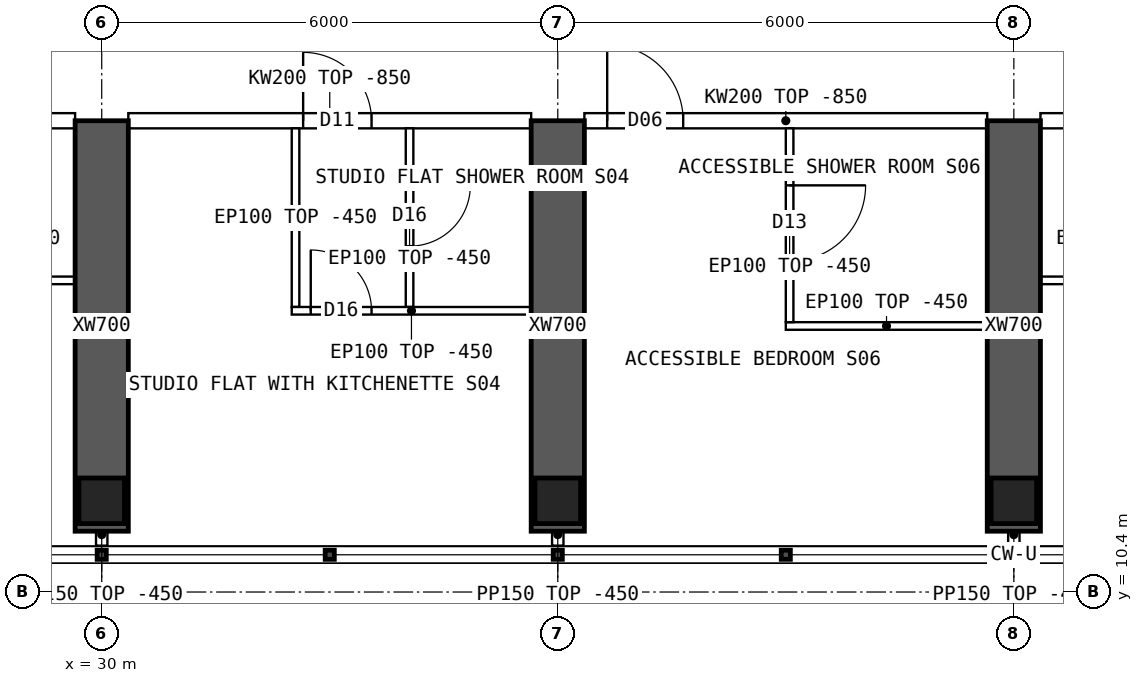
"""IFC4 building model, lengths in metres.
Left out: names, types, materials, properties, quantities, classifications, styles, units other than length and angle.
Written with IfcOpenShell. Run it as: python <this file> out.ifc"""

import sys

from ifc_helpers import new_model, si_unit, direction, frame, frame_2d, origin, origin_2d, place, context, subcontext, project, spatial, polyline, rectangle, hollow_rectangle, outline, extrude, element, fill, save


model = new_model("IFC4")
c1 = context("Model", 3, precision=1e-05, world=origin(), true_north=direction((0.0, 1.0)))
c2 = subcontext(c1, "Body", "Model", "MODEL_VIEW")
j1 = project(units=[si_unit("LENGTHUNIT", "METRE"), si_unit("PLANEANGLEUNIT", "RADIAN")], contexts=[c1])
p1 = place(None, origin())
s1 = spatial("IfcSite", under=j1, at=p1, CompositionType="ELEMENT")
p2 = place(p1, origin())
s2 = spatial("IfcBuilding", under=s1, at=p2, CompositionType="ELEMENT")
p3 = place(p2, frame((0.0, 0.0, 227.8)))
s3 = spatial("IfcBuildingStorey", under=s2, at=p3, CompositionType="ELEMENT", Elevation=227.8)
for number, where, z_axis, x_axis in (
    (1, (30.0, 11.6, 0.0), (0.0, 0.0, 1.0), (1.0, 0.0, 0.0)),
    (2, (36.0, 11.6, 0.0), (0.0, 0.0, 1.0), (1.0, 0.0, 0.0)),
    (3, (42.0, 11.6, 0.0), (0.0, 0.0, 1.0), (1.0, 0.0, 0.0)),
):
    element("IfcColumn", number, at=place(p3, frame(where, z_axis=z_axis, x_axis=x_axis)), inside=s3, PredefinedType="COLUMN", context=c2, shape_type="SweptSolid", body=[
        extrude(hollow_rectangle(XDim=0.6, YDim=0.6, WallThickness=0.06, at=origin_2d()), origin(), (0.0, 0.0, 1.0), 3.75),
    ])
for number, where, z_axis, x_axis in (
    (4, (30.0, 11.2, 0.0), (0.0, 0.0, 1.0), (0.0, 1.0, 0.0)),
    (5, (36.0, 11.2, 0.0), (0.0, 0.0, 1.0), (0.0, 1.0, 0.0)),
    (6, (42.0, 11.2, 0.0), (0.0, 0.0, 1.0), (0.0, 1.0, 0.0)),
):
    element("IfcWall", number, at=place(p3, frame(where, z_axis=z_axis, x_axis=x_axis)), inside=s3, PredefinedType="SHEAR", context=c2, shape_type="SweptSolid", body=[
        extrude(rectangle(XDim=5.4, YDim=0.7, at=frame_2d((2.7, 0.0))), origin(), (0.0, 0.0, 1.0), 3.75),
    ])
p4 = place(p3, frame((24.35, 16.6, 0.0), z_axis=(0.0, 0.0, 1.0), x_axis=(1.0, 0.0, 0.0)))
e7 = element("IfcWall", 7, at=p4, inside=s3, PredefinedType="SOLIDWALL", context=c2, shape_type="SweptSolid", body=[
    extrude(outline(polyline([(0.0, 0.0), (5.3, 0.0), (5.3, 2.9), (0.0, 2.9), (0.0, 0.0)])), frame((0.0, 0.1, 0.0), z_axis=(0.0, -1.0, 0.0), x_axis=(1.0, 0.0, 0.0)), (0.0, 0.0, 1.0), 0.2),
])
p5 = place(p4, frame((0.1, 0.0, 0.0)))
e8 = element("IfcOpeningElement", 8, at=p5, cuts=e7, PredefinedType="OPENING", context=c2, shape_type="SweptSolid", body=[
    extrude(rectangle(XDim=0.9, YDim=2.1, at=frame_2d((0.45, 1.05))), frame((0.0, 0.11, 0.0), z_axis=(0.0, -1.0, 0.0), x_axis=(1.0, 0.0, 0.0)), (0.0, 0.0, 1.0), 0.22),
])
p6 = place(p3, frame((30.35, 16.6, 0.0), z_axis=(0.0, 0.0, 1.0), x_axis=(1.0, 0.0, 0.0)))
e9 = element("IfcWall", 9, at=p6, inside=s3, PredefinedType="SOLIDWALL", context=c2, shape_type="SweptSolid", body=[
    extrude(outline(polyline([(0.0, 0.0), (5.3, 0.0), (5.3, 2.9), (0.0, 2.9), (0.0, 0.0)])), frame((0.0, 0.1, 0.0), z_axis=(0.0, -1.0, 0.0), x_axis=(1.0, 0.0, 0.0)), (0.0, 0.0, 1.0), 0.2),
])
p7 = place(p6, frame((2.3, 0.0, 0.0)))
e10 = element("IfcOpeningElement", 10, at=p7, cuts=e9, PredefinedType="OPENING", context=c2, shape_type="SweptSolid", body=[
    extrude(rectangle(XDim=0.9, YDim=2.1, at=frame_2d((0.45, 1.05))), frame((0.0, 0.11, 0.0), z_axis=(0.0, -1.0, 0.0), x_axis=(1.0, 0.0, 0.0)), (0.0, 0.0, 1.0), 0.22),
])
p8 = place(p3, frame((36.35, 16.6, 0.0), z_axis=(0.0, 0.0, 1.0), x_axis=(1.0, 0.0, 0.0)))
e11 = element("IfcWall", 11, at=p8, inside=s3, PredefinedType="SOLIDWALL", context=c2, shape_type="SweptSolid", body=[
    extrude(outline(polyline([(0.0, 0.0), (5.3, 0.0), (5.3, 2.9), (0.0, 2.9), (0.0, 0.0)])), frame((0.0, 0.1, 0.0), z_axis=(0.0, -1.0, 0.0), x_axis=(1.0, 0.0, 0.0)), (0.0, 0.0, 1.0), 0.2),
])
p9 = place(p8, frame((0.3, 0.0, 0.0)))
e12 = element("IfcOpeningElement", 12, at=p9, cuts=e11, PredefinedType="OPENING", context=c2, shape_type="SweptSolid", body=[
    extrude(rectangle(XDim=1.0, YDim=2.1, at=frame_2d((0.5, 1.05))), frame((0.0, 0.11, 0.0), z_axis=(0.0, -1.0, 0.0), x_axis=(1.0, 0.0, 0.0)), (0.0, 0.0, 1.0), 0.22),
])
p10 = place(p3, frame((42.35, 16.6, 0.0), z_axis=(0.0, 0.0, 1.0), x_axis=(1.0, 0.0, 0.0)))
e13 = element("IfcWall", 13, at=p10, inside=s3, PredefinedType="SOLIDWALL", context=c2, shape_type="SweptSolid", body=[
    extrude(outline(polyline([(0.0, 0.0), (5.3, 0.0), (5.3, 2.9), (0.0, 2.9), (0.0, 0.0)])), frame((0.0, 0.1, 0.0), z_axis=(0.0, -1.0, 0.0), x_axis=(1.0, 0.0, 0.0)), (0.0, 0.0, 1.0), 0.2),
])
p11 = place(p10, frame((2.6, 0.0, 0.0)))
e14 = element("IfcOpeningElement", 14, at=p11, cuts=e13, PredefinedType="OPENING", context=c2, shape_type="SweptSolid", body=[
    extrude(rectangle(XDim=0.9, YDim=2.1, at=frame_2d((0.45, 1.05))), frame((0.0, 0.11, 0.0), z_axis=(0.0, -1.0, 0.0), x_axis=(1.0, 0.0, 0.0)), (0.0, 0.0, 1.0), 0.22),
])
p12 = place(p3, frame((29.65, 14.5, 0.0), z_axis=(0.0, 0.0, 1.0), x_axis=(-1.0, 0.0, 0.0)))
e15 = element("IfcWall", 15, at=p12, inside=s3, PredefinedType="PARTITIONING", context=c2, shape_type="SweptSolid", body=[
    extrude(rectangle(XDim=2.55, YDim=0.1, at=frame_2d((1.275, 0.0))), origin(), (0.0, 0.0, 1.0), 3.3),
])
p13 = place(p12, frame((0.825, 0.0, 0.0)))
e16 = element("IfcOpeningElement", 16, at=p13, cuts=e15, PredefinedType="OPENING", context=c2, shape_type="SweptSolid", body=[
    extrude(rectangle(XDim=0.9, YDim=2.1, at=frame_2d((0.45, 1.05))), frame((0.0, 0.06, 0.0), z_axis=(0.0, -1.0, 0.0), x_axis=(1.0, 0.0, 0.0)), (0.0, 0.0, 1.0), 0.12),
])
p14 = place(p3, frame((35.65, 14.1, 0.0), z_axis=(0.0, 0.0, 1.0), x_axis=(-1.0, 0.0, 0.0)))
e17 = element("IfcWall", 17, at=p14, inside=s3, PredefinedType="PARTITIONING", context=c2, shape_type="SweptSolid", body=[
    extrude(rectangle(XDim=3.15, YDim=0.1, at=frame_2d((1.575, 0.0))), origin(), (0.0, 0.0, 1.0), 3.3),
])
p15 = place(p14, frame((2.1, 0.0, 0.0)))
e18 = element("IfcOpeningElement", 18, at=p15, cuts=e17, PredefinedType="OPENING", context=c2, shape_type="SweptSolid", body=[
    extrude(rectangle(XDim=0.8, YDim=2.1, at=frame_2d((0.4, 1.05))), frame((0.0, 0.06, 0.0), z_axis=(0.0, -1.0, 0.0), x_axis=(1.0, 0.0, 0.0)), (0.0, 0.0, 1.0), 0.12),
])
p16 = place(p3, frame((32.55, 14.15, 0.0), z_axis=(0.0, 0.0, 1.0), x_axis=(0.0, 1.0, 0.0)))
e19 = element("IfcWall", 19, at=p16, inside=s3, PredefinedType="PARTITIONING", context=c2, shape_type="SweptSolid", body=[
    extrude(outline(polyline([(0.0, 0.0), (2.35, 0.0), (2.35, 2.9), (2.302, 2.9), (2.3, 3.3), (0.0, 3.3), (0.0, 0.0)])), frame((0.0, 0.05, 0.0), z_axis=(0.0, -1.0, 0.0), x_axis=(1.0, 0.0, 0.0)), (0.0, 0.0, 1.0), 0.1),
])
p17 = place(p3, frame((34.05, 14.15, 0.0), z_axis=(0.0, 0.0, 1.0), x_axis=(0.0, 1.0, 0.0)))
e20 = element("IfcWall", 20, at=p17, inside=s3, PredefinedType="PARTITIONING", context=c2, shape_type="SweptSolid", body=[
    extrude(outline(polyline([(0.0, 0.0), (2.35, 0.0), (2.35, 2.9), (2.302, 2.9), (2.3, 3.3), (0.0, 3.3), (0.0, 0.0)])), frame((0.0, 0.05, 0.0), z_axis=(0.0, -1.0, 0.0), x_axis=(1.0, 0.0, 0.0)), (0.0, 0.0, 1.0), 0.1),
])
p18 = place(p17, frame((0.8, 0.0, 0.0)))
e21 = element("IfcOpeningElement", 21, at=p18, cuts=e20, PredefinedType="OPENING", context=c2, shape_type="SweptSolid", body=[
    extrude(rectangle(XDim=0.8, YDim=2.1, at=frame_2d((0.4, 1.05))), frame((0.0, 0.06, 0.0), z_axis=(0.0, -1.0, 0.0), x_axis=(1.0, 0.0, 0.0)), (0.0, 0.0, 1.0), 0.12),
])
p19 = place(p3, frame((39.0, 13.9, 0.0), z_axis=(0.0, 0.0, 1.0), x_axis=(1.0, 0.0, 0.0)))
e22 = element("IfcWall", 22, at=p19, inside=s3, PredefinedType="PARTITIONING", context=c2, shape_type="SweptSolid", body=[
    extrude(rectangle(XDim=2.65, YDim=0.1, at=frame_2d((1.325, 0.0))), origin(), (0.0, 0.0, 1.0), 3.3),
])
p20 = place(p3, frame((39.05, 13.95, 0.0), z_axis=(0.0, 0.0, 1.0), x_axis=(0.0, 1.0, 0.0)))
e23 = element("IfcWall", 23, at=p20, inside=s3, PredefinedType="PARTITIONING", context=c2, shape_type="SweptSolid", body=[
    extrude(outline(polyline([(0.0, 0.0), (2.55, 0.0), (2.55, 2.9), (2.502, 2.9), (2.5, 3.3), (0.0, 3.3), (0.0, 0.0)])), frame((0.0, 0.05, 0.0), z_axis=(0.0, -1.0, 0.0), x_axis=(1.0, 0.0, 0.0)), (0.0, 0.0, 1.0), 0.1),
])
p21 = place(p20, frame((0.8, 0.0, 0.0)))
e24 = element("IfcOpeningElement", 24, at=p21, cuts=e23, PredefinedType="OPENING", context=c2, shape_type="SweptSolid", body=[
    extrude(rectangle(XDim=1.0, YDim=2.1, at=frame_2d((0.5, 1.05))), frame((0.0, 0.06, 0.0), z_axis=(0.0, -1.0, 0.0), x_axis=(1.0, 0.0, 0.0)), (0.0, 0.0, 1.0), 0.12),
])
p22 = place(p3, frame((44.9, 14.5, 0.0), z_axis=(0.0, 0.0, 1.0), x_axis=(-1.0, 0.0, 0.0)))
e25 = element("IfcWall", 25, at=p22, inside=s3, PredefinedType="PARTITIONING", context=c2, shape_type="SweptSolid", body=[
    extrude(rectangle(XDim=2.55, YDim=0.1, at=frame_2d((1.275, 0.0))), origin(), (0.0, 0.0, 1.0), 3.3),
])
p23 = place(p22, frame((0.825, 0.0, 0.0)))
e26 = element("IfcOpeningElement", 26, at=p23, cuts=e25, PredefinedType="OPENING", context=c2, shape_type="SweptSolid", body=[
    extrude(rectangle(XDim=0.9, YDim=2.1, at=frame_2d((0.45, 1.05))), frame((0.0, 0.06, 0.0), z_axis=(0.0, -1.0, 0.0), x_axis=(1.0, 0.0, 0.0)), (0.0, 0.0, 1.0), 0.12),
])
for number, where, z_axis, x_axis in (
    (27, (30.0, 11.3, 0.0), (0.0, 0.0, 1.0), (0.0, -1.0, 0.0)),
    (28, (36.0, 11.3, 0.0), (0.0, 0.0, 1.0), (0.0, -1.0, 0.0)),
    (29, (42.0, 11.3, 0.0), (0.0, 0.0, 1.0), (0.0, -1.0, 0.0)),
):
    element("IfcWall", number, at=place(p3, frame(where, z_axis=z_axis, x_axis=x_axis)), inside=s3, PredefinedType="PARTITIONING", context=c2, shape_type="SweptSolid", body=[
        extrude(rectangle(XDim=0.29, YDim=0.15, at=frame_2d((0.145, 0.0))), origin(), (0.0, 0.0, 1.0), 3.3),
    ])
p24 = place(p15, origin())
e30 = element("IfcDoor", 30, at=p24, inside=s3, OperationType="SINGLE_SWING_RIGHT", PredefinedType="DOOR", context=c2, shape_type="SweptSolid", body=[
    extrude(rectangle(XDim=0.8, YDim=2.1, at=frame_2d((0.4, 1.05))), frame((0.0, 0.025, 0.0), z_axis=(0.0, -1.0, 0.0), x_axis=(1.0, 0.0, 0.0)), (0.0, 0.0, 1.0), 0.05),
])
fill(e18, e30)
p25 = place(p18, origin())
e31 = element("IfcDoor", 31, at=p25, inside=s3, OperationType="SINGLE_SWING_RIGHT", PredefinedType="DOOR", context=c2, shape_type="SweptSolid", body=[
    extrude(rectangle(XDim=0.8, YDim=2.1, at=frame_2d((0.4, 1.05))), frame((0.0, 0.025, 0.0), z_axis=(0.0, -1.0, 0.0), x_axis=(1.0, 0.0, 0.0)), (0.0, 0.0, 1.0), 0.05),
])
fill(e21, e31)
p26 = place(p7, origin())
e32 = element("IfcDoor", 32, at=p26, inside=s3, OperationType="SINGLE_SWING_LEFT", PredefinedType="DOOR", context=c2, shape_type="SweptSolid", body=[
    extrude(rectangle(XDim=0.9, YDim=2.1, at=frame_2d((0.45, 1.05))), frame((0.0, 0.025, 0.0), z_axis=(0.0, -1.0, 0.0), x_axis=(1.0, 0.0, 0.0)), (0.0, 0.0, 1.0), 0.05),
])
fill(e10, e32)
p27 = place(p21, origin())
e33 = element("IfcDoor", 33, at=p27, inside=s3, OperationType="SINGLE_SWING_RIGHT", PredefinedType="DOOR", context=c2, shape_type="SweptSolid", body=[
    extrude(rectangle(XDim=1.0, YDim=2.1, at=frame_2d((0.5, 1.05))), frame((0.0, 0.025, 0.0), z_axis=(0.0, -1.0, 0.0), x_axis=(1.0, 0.0, 0.0)), (0.0, 0.0, 1.0), 0.05),
])
fill(e24, e33)
p28 = place(p9, origin())
e34 = element("IfcDoor", 34, at=p28, inside=s3, OperationType="SINGLE_SWING_LEFT", PredefinedType="DOOR", context=c2, shape_type="SweptSolid", body=[
    extrude(rectangle(XDim=1.0, YDim=2.1, at=frame_2d((0.5, 1.05))), frame((0.0, 0.025, 0.0), z_axis=(0.0, -1.0, 0.0), x_axis=(1.0, 0.0, 0.0)), (0.0, 0.0, 1.0), 0.05),
])
fill(e12, e34)
save(model, sys.argv[1])
